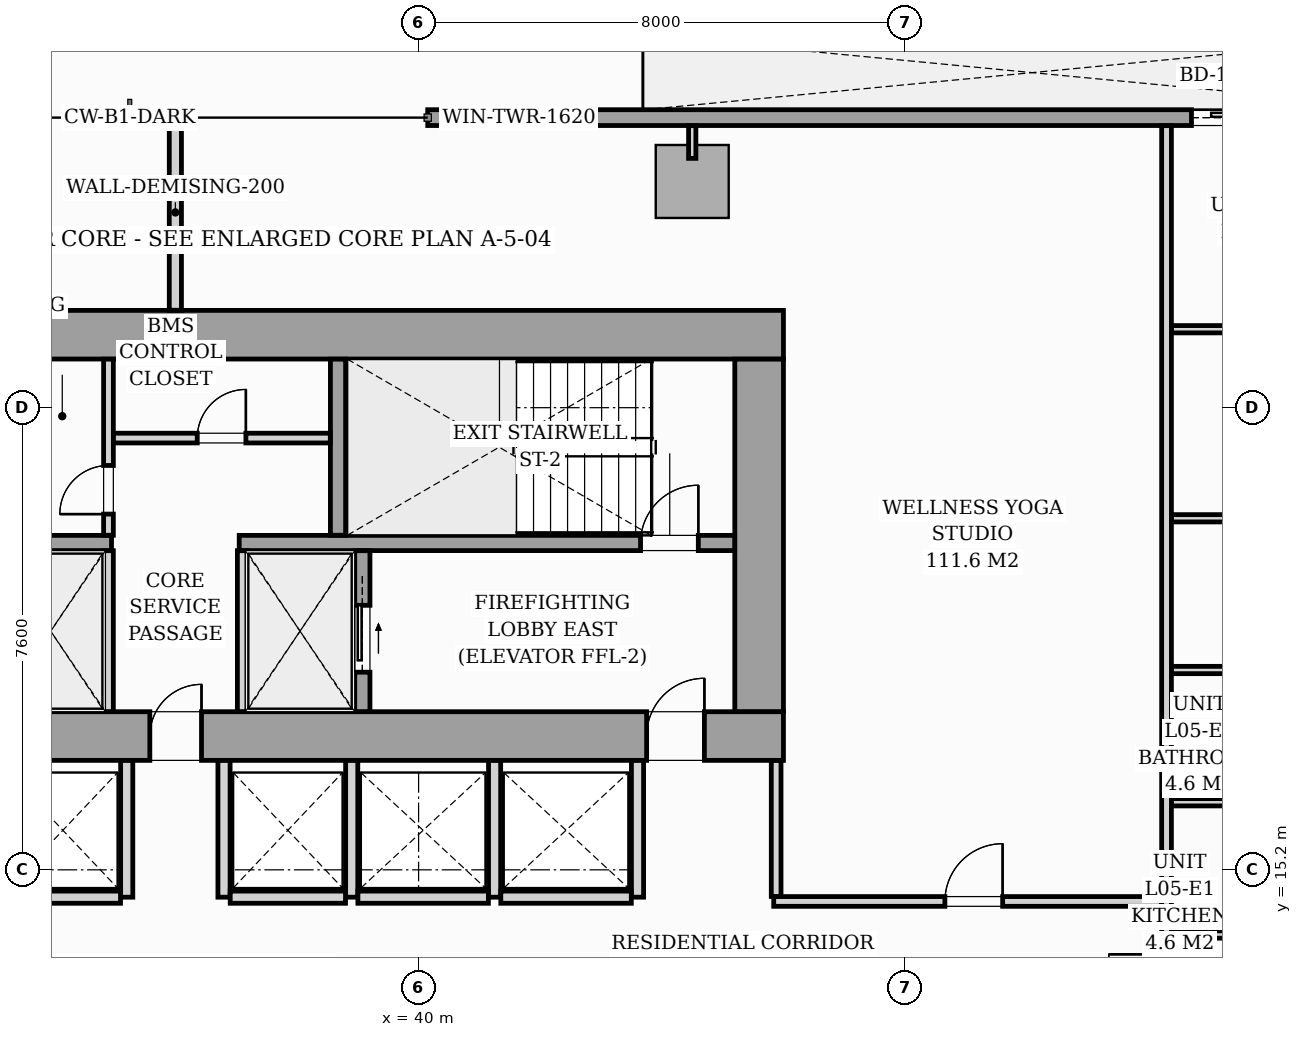
"""IFC4 building model, lengths in metres.
Left out: names, types, materials, properties, quantities, classifications, styles, units other than length and angle.
Written with IfcOpenShell. Run it as: python <this file> out.ifc"""

import sys

from ifc_helpers import new_model, si_unit, direction, frame, frame_2d, origin, origin_2d, place, context, subcontext, project, spatial, rectangle, i_section, extrude, source, transform, mapped, element, fill, save


model = new_model("IFC4")
c1 = context("Model", 3, precision=1e-05, world=origin(), true_north=direction((0.0, 1.0)))
c2 = subcontext(c1, "Body", "Model", "MODEL_VIEW")
j1 = project(units=[si_unit("LENGTHUNIT", "METRE"), si_unit("PLANEANGLEUNIT", "RADIAN")], contexts=[c1])
p1 = place(None, origin())
s1 = spatial("IfcSite", under=j1, at=p1, CompositionType="ELEMENT")
p2 = place(p1, origin())
s2 = spatial("IfcBuilding", under=s1, at=p2, CompositionType="ELEMENT")
p3 = place(p2, frame((0.0, 0.0, 23.0)))
s3 = spatial("IfcBuildingStorey", under=s2, at=p3, CompositionType="ELEMENT", Elevation=23.0)
m1 = source(origin(), c2, "Body", "SweptSolid", [
    extrude(i_section(OverallWidth=0.437, OverallDepth=0.514, WebThickness=0.061, FlangeThickness=0.097, FilletRadius=0.018, at=origin_2d()), origin(), (0.0, 0.0, 1.0), 3.196),
])
for number, where, z_axis, x_axis in (
    (1, (38.88, 17.4, 0.002), (0.0, 0.0, 1.0), (1.0, 0.0, 0.0)),
    (2, (45.6, 17.4, 0.002), (0.0, 0.0, 1.0), (1.0, 0.0, 0.0)),
    (3, (38.88, 24.0, 0.002), (0.0, 0.0, 1.0), (1.0, 0.0, 0.0)),
    (4, (45.6, 24.0, 0.002), (0.0, 0.0, 1.0), (1.0, 0.0, 0.0)),
):
    element("IfcColumn", number, at=place(p3, frame(where, z_axis=z_axis, x_axis=x_axis)), inside=s3, PredefinedType="PILASTER", context=c2, shape_type="MappedRepresentation", body=[
        mapped(m1, transform((0.0, 0.0, 0.0), scale=1.0)),
    ])
m2 = source(origin(), c2, "Body", "SweptSolid", [
    extrude(rectangle(XDim=1.2, YDim=1.2, at=origin_2d()), origin(), (0.0, 0.0, 1.0), 3.194),
])
p4 = place(p3, frame((44.5, 26.52, 0.004), z_axis=(0.0, 0.0, 1.0), x_axis=(1.0, 0.0, 0.0)))
e5 = element("IfcColumn", 5, at=p4, inside=s3, PredefinedType="COLUMN", context=c2, shape_type="MappedRepresentation", body=[
    mapped(m2, transform((0.0, 0.0, 0.0), scale=1.0)),
])
p5 = place(p3, frame((40.15, 27.57, 0.0), z_axis=(0.0, 0.0, 1.0), x_axis=(1.0, 0.0, 0.0)))
e6 = element("IfcWall", 6, at=p5, inside=s3, PredefinedType="STANDARD", context=c2, shape_type="SweptSolid", body=[
    extrude(rectangle(XDim=17.15, YDim=0.26, at=frame_2d((8.575, 0.0))), origin(), (0.0, 0.0, 1.0), 2.94),
])
p6 = place(p5, frame((12.56, 0.0, 0.0)))
e7 = element("IfcOpeningElement", 7, at=p6, cuts=e6, PredefinedType="OPENING", context=c2, shape_type="SweptSolid", body=[
    extrude(rectangle(XDim=1.8, YDim=2.06, at=frame_2d((0.9, 1.03))), frame((0.0, 0.14, 0.0), z_axis=(0.0, -1.0, 0.0), x_axis=(1.0, 0.0, 0.0)), (0.0, 0.0, 1.0), 0.28),
])
p7 = place(p5, frame((0.7, 0.0, 0.65)))
e8 = element("IfcOpeningElement", 8, at=p7, cuts=e6, PredefinedType="OPENING", context=c2, shape_type="SweptSolid", body=[
    extrude(rectangle(XDim=1.6, YDim=1.5, at=frame_2d((0.8, 0.75))), frame((0.0, 0.14, 0.0), z_axis=(0.0, -1.0, 0.0), x_axis=(1.0, 0.0, 0.0)), (0.0, 0.0, 1.0), 0.28),
])
p8 = place(p3, frame((26.0, 17.4, 0.0), z_axis=(0.0, 0.0, 1.0), x_axis=(1.0, 0.0, 0.0)))
e9 = element("IfcWall", 9, at=p8, inside=s3, PredefinedType="SHEAR", context=c2, shape_type="SweptSolid", body=[
    extrude(rectangle(XDim=20.0, YDim=0.8, at=frame_2d((10.0, 0.0))), origin(), (0.0, 0.0, 1.0), 3.2),
])
p9 = place(p8, frame((1.15, 0.0, 0.0)))
e10 = element("IfcOpeningElement", 10, at=p9, cuts=e9, PredefinedType="OPENING", context=c2, shape_type="SweptSolid", body=[
    extrude(rectangle(XDim=0.95, YDim=2.06, at=frame_2d((0.475, 1.03))), frame((0.0, 0.41, 0.0), z_axis=(0.0, -1.0, 0.0), x_axis=(1.0, 0.0, 0.0)), (0.0, 0.0, 1.0), 0.82),
])
p10 = place(p8, frame((9.58, 0.0, 0.0)))
e11 = element("IfcOpeningElement", 11, at=p10, cuts=e9, PredefinedType="OPENING", context=c2, shape_type="SweptSolid", body=[
    extrude(rectangle(XDim=0.85, YDim=2.0, at=frame_2d((0.425, 1.0))), frame((0.0, 0.41, 0.0), z_axis=(0.0, -1.0, 0.0), x_axis=(1.0, 0.0, 0.0)), (0.0, 0.0, 1.0), 0.82),
])
p11 = place(p8, frame((17.75, 0.0, 0.0)))
e12 = element("IfcOpeningElement", 12, at=p11, cuts=e9, PredefinedType="OPENING", context=c2, shape_type="SweptSolid", body=[
    extrude(rectangle(XDim=0.95, YDim=2.06, at=frame_2d((0.475, 1.03))), frame((0.0, 0.41, 0.0), z_axis=(0.0, -1.0, 0.0), x_axis=(1.0, 0.0, 0.0)), (0.0, 0.0, 1.0), 0.82),
])
p12 = place(p3, frame((26.0, 24.0, 0.0), z_axis=(0.0, 0.0, 1.0), x_axis=(1.0, 0.0, 0.0)))
e13 = element("IfcWall", 13, at=p12, inside=s3, PredefinedType="SHEAR", context=c2, shape_type="SweptSolid", body=[
    extrude(rectangle(XDim=20.0, YDim=0.8, at=frame_2d((10.0, 0.0))), origin(), (0.0, 0.0, 1.0), 3.2),
])
p13 = place(p3, frame((45.6, 17.802, 0.0), z_axis=(0.0, 0.0, 1.0), x_axis=(0.0, 1.0, 0.0)))
e14 = element("IfcWall", 14, at=p13, inside=s3, PredefinedType="SHEAR", context=c2, shape_type="SweptSolid", body=[
    extrude(rectangle(XDim=5.796, YDim=0.8, at=frame_2d((2.898, 0.0))), origin(), (0.0, 0.0, 1.0), 3.2),
])
p14 = place(p3, frame((26.802, 20.575, 0.0), z_axis=(0.0, 0.0, 1.0), x_axis=(1.0, 0.0, 0.0)))
e15 = element("IfcWall", 15, at=p14, inside=s3, PredefinedType="SOLIDWALL", context=c2, shape_type="SweptSolid", body=[
    extrude(rectangle(XDim=8.148, YDim=0.25, at=frame_2d((4.074, 0.0))), origin(), (0.0, 0.0, 1.0), 3.2),
])
p15 = place(p14, frame((0.398, 0.0, 0.0)))
e16 = element("IfcOpeningElement", 16, at=p15, cuts=e15, PredefinedType="OPENING", context=c2, shape_type="SweptSolid", body=[
    extrude(rectangle(XDim=0.95, YDim=2.06, at=frame_2d((0.475, 1.03))), frame((0.0, 0.135, 0.0), z_axis=(0.0, -1.0, 0.0), x_axis=(1.0, 0.0, 0.0)), (0.0, 0.0, 1.0), 0.27),
])
p16 = place(p3, frame((37.05, 20.575, 0.0), z_axis=(0.0, 0.0, 1.0), x_axis=(1.0, 0.0, 0.0)))
e17 = element("IfcWall", 17, at=p16, inside=s3, PredefinedType="SOLIDWALL", context=c2, shape_type="SweptSolid", body=[
    extrude(rectangle(XDim=8.148, YDim=0.25, at=frame_2d((4.074, 0.0))), origin(), (0.0, 0.0, 1.0), 3.2),
])
p17 = place(p16, frame((6.6, 0.0, 0.0)))
e18 = element("IfcOpeningElement", 18, at=p17, cuts=e17, PredefinedType="OPENING", context=c2, shape_type="SweptSolid", body=[
    extrude(rectangle(XDim=0.95, YDim=2.06, at=frame_2d((0.475, 1.03))), frame((0.0, 0.135, 0.0), z_axis=(0.0, -1.0, 0.0), x_axis=(1.0, 0.0, 0.0)), (0.0, 0.0, 1.0), 0.27),
])
p18 = place(p3, frame((38.675, 20.702, 0.0), z_axis=(0.0, 0.0, 1.0), x_axis=(0.0, 1.0, 0.0)))
e19 = element("IfcWall", 19, at=p18, inside=s3, PredefinedType="SOLIDWALL", context=c2, shape_type="SweptSolid", body=[
    extrude(rectangle(XDim=2.896, YDim=0.25, at=frame_2d((1.448, 0.0))), origin(), (0.0, 0.0, 1.0), 3.2),
])
for number, where, z_axis, x_axis in (
    (20, (34.9, 17.802, 0.0), (0.0, 0.0, 1.0), (0.0, 1.0, 0.0)),
    (21, (37.1, 17.802, 0.0), (0.0, 0.0, 1.0), (0.0, 1.0, 0.0)),
):
    element("IfcWall", number, at=place(p3, frame(where, z_axis=z_axis, x_axis=x_axis)), inside=s3, PredefinedType="PARTITIONING", context=c2, shape_type="SweptSolid", body=[
        extrude(rectangle(XDim=2.646, YDim=0.16, at=frame_2d((1.323, 0.0))), origin(), (0.0, 0.0, 1.0), 2.94),
    ])
p19 = place(p3, frame((39.075, 17.802, 0.0), z_axis=(0.0, 0.0, 1.0), x_axis=(0.0, 1.0, 0.0)))
e22 = element("IfcWall", 22, at=p19, inside=s3, PredefinedType="SOLIDWALL", context=c2, shape_type="SweptSolid", body=[
    extrude(rectangle(XDim=2.646, YDim=0.25, at=frame_2d((1.323, 0.0))), origin(), (0.0, 0.0, 1.0), 3.2),
])
p20 = place(p19, frame((0.648, 0.0, 0.0)))
e23 = element("IfcOpeningElement", 23, at=p20, cuts=e22, PredefinedType="OPENING", context=c2, shape_type="SweptSolid", body=[
    extrude(rectangle(XDim=1.1, YDim=2.08, at=frame_2d((0.55, 1.04))), frame((0.0, 0.135, 0.0), z_axis=(0.0, -1.0, 0.0), x_axis=(1.0, 0.0, 0.0)), (0.0, 0.0, 1.0), 0.27),
])
p21 = place(p3, frame((34.9, 20.702, 0.0), z_axis=(0.0, 0.0, 1.0), x_axis=(0.0, 1.0, 0.0)))
e24 = element("IfcWall", 24, at=p21, inside=s3, PredefinedType="PARTITIONING", context=c2, shape_type="SweptSolid", body=[
    extrude(rectangle(XDim=2.896, YDim=0.16, at=frame_2d((1.448, 0.0))), origin(), (0.0, 0.0, 1.0), 2.94),
])
p22 = place(p21, frame((0.348, 0.0, 0.0)))
e25 = element("IfcOpeningElement", 25, at=p22, cuts=e24, PredefinedType="OPENING", context=c2, shape_type="SweptSolid", body=[
    extrude(rectangle(XDim=0.8, YDim=2.05, at=frame_2d((0.4, 1.025))), frame((0.0, 0.09, 0.0), z_axis=(0.0, -1.0, 0.0), x_axis=(1.0, 0.0, 0.0)), (0.0, 0.0, 1.0), 0.18),
])
p23 = place(p3, frame((34.982, 22.3, 0.0), z_axis=(0.0, 0.0, 1.0), x_axis=(1.0, 0.0, 0.0)))
e26 = element("IfcWall", 26, at=p23, inside=s3, PredefinedType="PARTITIONING", context=c2, shape_type="SweptSolid", body=[
    extrude(rectangle(XDim=3.566, YDim=0.16, at=frame_2d((1.783, 0.0))), origin(), (0.0, 0.0, 1.0), 2.94),
])
p24 = place(p23, frame((1.378, 0.0, 0.0)))
e27 = element("IfcOpeningElement", 27, at=p24, cuts=e26, PredefinedType="OPENING", context=c2, shape_type="SweptSolid", body=[
    extrude(rectangle(XDim=0.8, YDim=2.05, at=frame_2d((0.4, 1.025))), frame((0.0, 0.09, 0.0), z_axis=(0.0, -1.0, 0.0), x_axis=(1.0, 0.0, 0.0)), (0.0, 0.0, 1.0), 0.18),
])
p25 = place(p3, frame((35.2, 14.75, 0.0), z_axis=(0.0, 0.0, 1.0), x_axis=(0.0, 1.0, 0.0)))
e28 = element("IfcWall", 28, at=p25, inside=s3, PredefinedType="PARTITIONING", context=c2, shape_type="SweptSolid", body=[
    extrude(rectangle(XDim=2.248, YDim=0.2, at=frame_2d((1.124, 0.0))), origin(), (0.0, 0.0, 1.0), 2.94),
])
p26 = place(p3, frame((33.202, 14.75, 0.0), z_axis=(0.0, 0.0, 1.0), x_axis=(1.0, 0.0, 0.0)))
e29 = element("IfcWall", 29, at=p26, inside=s3, PredefinedType="PARTITIONING", context=c2, shape_type="SweptSolid", body=[
    extrude(rectangle(XDim=1.896, YDim=0.2, at=frame_2d((0.948, 0.0))), origin(), (0.0, 0.0, 1.0), 2.94),
])
for number, where, z_axis, x_axis in (
    (30, (36.8, 14.75, 0.0), (0.0, 0.0, 1.0), (0.0, 1.0, 0.0)),
    (31, (38.9, 14.75, 0.0), (0.0, 0.0, 1.0), (0.0, 1.0, 0.0)),
):
    element("IfcWall", number, at=place(p3, frame(where, z_axis=z_axis, x_axis=x_axis)), inside=s3, PredefinedType="PARTITIONING", context=c2, shape_type="SweptSolid", body=[
        extrude(rectangle(XDim=2.248, YDim=0.2, at=frame_2d((1.124, 0.0))), origin(), (0.0, 0.0, 1.0), 2.94),
    ])
p27 = place(p3, frame((36.902, 14.75, 0.0), z_axis=(0.0, 0.0, 1.0), x_axis=(1.0, 0.0, 0.0)))
e32 = element("IfcWall", 32, at=p27, inside=s3, PredefinedType="PARTITIONING", context=c2, shape_type="SweptSolid", body=[
    extrude(rectangle(XDim=1.896, YDim=0.2, at=frame_2d((0.948, 0.0))), origin(), (0.0, 0.0, 1.0), 2.94),
])
for number, where, z_axis, x_axis in (
    (33, (41.25, 14.75, 0.0), (0.0, 0.0, 1.0), (0.0, 1.0, 0.0)),
    (34, (43.6, 14.75, 0.0), (0.0, 0.0, 1.0), (0.0, 1.0, 0.0)),
):
    element("IfcWall", number, at=place(p3, frame(where, z_axis=z_axis, x_axis=x_axis)), inside=s3, PredefinedType="PARTITIONING", context=c2, shape_type="SweptSolid", body=[
        extrude(rectangle(XDim=2.248, YDim=0.2, at=frame_2d((1.124, 0.0))), origin(), (0.0, 0.0, 1.0), 2.94),
    ])
for number, where, z_axis, x_axis in (
    (35, (39.002, 14.75, 0.0), (0.0, 0.0, 1.0), (1.0, 0.0, 0.0)),
    (36, (41.352, 14.75, 0.0), (0.0, 0.0, 1.0), (1.0, 0.0, 0.0)),
):
    element("IfcWall", number, at=place(p3, frame(where, z_axis=z_axis, x_axis=x_axis)), inside=s3, PredefinedType="PARTITIONING", context=c2, shape_type="SweptSolid", body=[
        extrude(rectangle(XDim=2.146, YDim=0.2, at=frame_2d((1.073, 0.0))), origin(), (0.0, 0.0, 1.0), 2.94),
    ])
p28 = place(p3, frame((52.3, 12.432, 0.0), z_axis=(0.0, 0.0, 1.0), x_axis=(0.0, 1.0, 0.0)))
e37 = element("IfcWall", 37, at=p28, inside=s3, PredefinedType="PARTITIONING", context=c2, shape_type="SweptSolid", body=[
    extrude(rectangle(XDim=15.006, YDim=0.16, at=frame_2d((7.503, 0.0))), origin(), (0.0, 0.0, 1.0), 2.94),
])
p29 = place(p28, frame((0.429, 0.0, 0.0)))
e38 = element("IfcOpeningElement", 38, at=p29, cuts=e37, PredefinedType="OPENING", context=c2, shape_type="SweptSolid", body=[
    extrude(rectangle(XDim=0.95, YDim=2.06, at=frame_2d((0.475, 1.03))), frame((0.0, 0.09, 0.0), z_axis=(0.0, -1.0, 0.0), x_axis=(1.0, 0.0, 0.0)), (0.0, 0.0, 1.0), 0.18),
])
p30 = place(p3, frame((36.0, 24.402, 0.0), z_axis=(0.0, 0.0, 1.0), x_axis=(0.0, 1.0, 0.0)))
e39 = element("IfcWall", 39, at=p30, inside=s3, PredefinedType="PARTITIONING", context=c2, shape_type="SweptSolid", body=[
    extrude(rectangle(XDim=3.218, YDim=0.2, at=frame_2d((1.609, 0.0))), origin(), (0.0, 0.0, 1.0), 2.94),
])
p31 = place(p3, frame((52.382, 16.311, 0.0), z_axis=(0.0, 0.0, 1.0), x_axis=(1.0, 0.0, 0.0)))
e40 = element("IfcWall", 40, at=p31, inside=s3, PredefinedType="PARTITIONING", context=c2, shape_type="SweptSolid", body=[
    extrude(rectangle(XDim=2.256, YDim=0.12, at=frame_2d((1.128, 0.0))), origin(), (0.0, 0.0, 1.0), 2.045),
])
for number, where, z_axis, x_axis in (
    (41, (52.382, 14.136, 0.0), (0.0, 0.0, 1.0), (1.0, 0.0, 0.0)),
    (42, (52.382, 18.486, 0.0), (0.0, 0.0, 1.0), (1.0, 0.0, 0.0)),
):
    element("IfcWall", number, at=place(p3, frame(where, z_axis=z_axis, x_axis=x_axis)), inside=s3, PredefinedType="PARTITIONING", context=c2, shape_type="SweptSolid", body=[
        extrude(rectangle(XDim=2.256, YDim=0.12, at=frame_2d((1.128, 0.0))), origin(), (0.0, 0.0, 1.0), 2.94),
    ])
p32 = place(p3, frame((52.382, 24.09, 0.0), z_axis=(0.0, 0.0, 1.0), x_axis=(1.0, 0.0, 0.0)))
e43 = element("IfcWall", 43, at=p32, inside=s3, PredefinedType="PARTITIONING", context=c2, shape_type="SweptSolid", body=[
    extrude(rectangle(XDim=7.338, YDim=0.12, at=frame_2d((3.669, 0.0))), origin(), (0.0, 0.0, 1.0), 2.94),
])
p33 = place(p32, frame((3.253, 0.0, 0.0)))
e44 = element("IfcOpeningElement", 44, at=p33, cuts=e43, PredefinedType="OPENING", context=c2, shape_type="SweptSolid", body=[
    extrude(rectangle(XDim=0.85, YDim=2.05, at=frame_2d((0.425, 1.025))), frame((0.0, 0.07, 0.0), z_axis=(0.0, -1.0, 0.0), x_axis=(1.0, 0.0, 0.0)), (0.0, 0.0, 1.0), 0.14),
])
p34 = place(p3, frame((52.382, 20.981, 0.0), z_axis=(0.0, 0.0, 1.0), x_axis=(1.0, 0.0, 0.0)))
e45 = element("IfcWall", 45, at=p34, inside=s3, PredefinedType="PARTITIONING", context=c2, shape_type="SweptSolid", body=[
    extrude(rectangle(XDim=7.338, YDim=0.12, at=frame_2d((3.669, 0.0))), origin(), (0.0, 0.0, 1.0), 2.94),
])
p35 = place(p34, frame((3.253, 0.0, 0.0)))
e46 = element("IfcOpeningElement", 46, at=p35, cuts=e45, PredefinedType="OPENING", context=c2, shape_type="SweptSolid", body=[
    extrude(rectangle(XDim=0.85, YDim=2.05, at=frame_2d((0.425, 1.025))), frame((0.0, 0.07, 0.0), z_axis=(0.0, -1.0, 0.0), x_axis=(1.0, 0.0, 0.0)), (0.0, 0.0, 1.0), 0.14),
])
p36 = place(p3, frame((45.84, 14.68, 0.0), z_axis=(0.0, 0.0, 1.0), x_axis=(1.0, 0.0, 0.0)))
e47 = element("IfcWall", 47, at=p36, inside=s3, PredefinedType="PARTITIONING", context=c2, shape_type="SweptSolid", body=[
    extrude(rectangle(XDim=6.378, YDim=0.16, at=frame_2d((3.189, 0.0))), origin(), (0.0, 0.0, 1.0), 2.94),
])
p37 = place(p36, frame((2.815, 0.0, 0.0)))
e48 = element("IfcOpeningElement", 48, at=p37, cuts=e47, PredefinedType="OPENING", context=c2, shape_type="SweptSolid", body=[
    extrude(rectangle(XDim=0.95, YDim=2.06, at=frame_2d((0.475, 1.03))), frame((0.0, 0.09, 0.0), z_axis=(0.0, -1.0, 0.0), x_axis=(1.0, 0.0, 0.0)), (0.0, 0.0, 1.0), 0.18),
])
p38 = place(p3, frame((45.88, 14.762, 0.0), z_axis=(0.0, 0.0, 1.0), x_axis=(0.0, 1.0, 0.0)))
e49 = element("IfcWall", 49, at=p38, inside=s3, PredefinedType="PARTITIONING", context=c2, shape_type="SweptSolid", body=[
    extrude(rectangle(XDim=2.236, YDim=0.16, at=frame_2d((1.118, 0.0))), origin(), (0.0, 0.0, 1.0), 2.94),
])
p39 = place(p3, frame((44.5, 26.9, 0.0), z_axis=(0.0, 0.0, 1.0), x_axis=(0.0, 1.0, 0.0)))
e50 = element("IfcWall", 50, at=p39, inside=s3, PredefinedType="PARTITIONING", context=c2, shape_type="SweptSolid", body=[
    extrude(rectangle(XDim=0.538, YDim=0.12, at=frame_2d((0.269, 0.0))), origin(), (0.0, 0.0, 1.0), 2.94),
])
m3 = source(origin(), c2, "Body", "SweptSolid", [
    extrude(rectangle(XDim=1.8, YDim=2.06, at=frame_2d((0.9, 1.03))), frame((0.0, 0.025, 0.0), z_axis=(0.0, -1.0, 0.0), x_axis=(1.0, 0.0, 0.0)), (0.0, 0.0, 1.0), 0.05),
])
p40 = place(p6, origin())
e51 = element("IfcDoor", 51, at=p40, inside=s3, OperationType="SLIDING_TO_RIGHT", PredefinedType="DOOR", context=c2, shape_type="MappedRepresentation", body=[
    mapped(m3, transform((0.0, 0.0, 0.0), scale=1.0)),
])
fill(e7, e51)
m4 = source(origin(), c2, "Body", "SweptSolid", [
    extrude(rectangle(XDim=1.6, YDim=1.5, at=frame_2d((0.8, 0.75))), frame((0.0, 0.03, 0.0), z_axis=(0.0, -1.0, 0.0), x_axis=(1.0, 0.0, 0.0)), (0.0, 0.0, 1.0), 0.06),
])
p41 = place(p7, origin())
e52 = element("IfcWindow", 52, at=p41, inside=s3, PartitioningType="SINGLE_PANEL", PredefinedType="WINDOW", context=c2, shape_type="MappedRepresentation", body=[
    mapped(m4, transform((0.0, 0.0, 0.0), scale=1.0)),
])
fill(e8, e52)
m5 = source(origin(), c2, "Body", "SweptSolid", [
    extrude(rectangle(XDim=0.85, YDim=2.0, at=frame_2d((0.425, 1.0))), frame((0.0, 0.025, 0.0), z_axis=(0.0, -1.0, 0.0), x_axis=(1.0, 0.0, 0.0)), (0.0, 0.0, 1.0), 0.05),
])
p42 = place(p10, origin())
e53 = element("IfcDoor", 53, at=p42, inside=s3, OperationType="SINGLE_SWING_RIGHT", PredefinedType="DOOR", context=c2, shape_type="MappedRepresentation", body=[
    mapped(m5, transform((0.0, 0.0, 0.0), scale=1.0)),
])
fill(e11, e53)
m6 = source(origin(), c2, "Body", "SweptSolid", [
    extrude(rectangle(XDim=0.95, YDim=2.06, at=frame_2d((0.475, 1.03))), frame((0.0, 0.025, 0.0), z_axis=(0.0, -1.0, 0.0), x_axis=(1.0, 0.0, 0.0)), (0.0, 0.0, 1.0), 0.05),
])
p43 = place(p11, origin())
e54 = element("IfcDoor", 54, at=p43, inside=s3, OperationType="SINGLE_SWING_RIGHT", PredefinedType="DOOR", context=c2, shape_type="MappedRepresentation", body=[
    mapped(m6, transform((0.0, 0.0, 0.0), scale=1.0)),
])
fill(e12, e54)
p44 = place(p17, origin())
e55 = element("IfcDoor", 55, at=p44, inside=s3, OperationType="SINGLE_SWING_RIGHT", PredefinedType="DOOR", context=c2, shape_type="MappedRepresentation", body=[
    mapped(m6, transform((0.0, 0.0, 0.0), scale=1.0)),
])
fill(e18, e55)
m7 = source(origin(), c2, "Body", "SweptSolid", [
    extrude(rectangle(XDim=1.1, YDim=2.08, at=frame_2d((0.55, 1.04))), frame((0.0, 0.025, 0.0), z_axis=(0.0, -1.0, 0.0), x_axis=(1.0, 0.0, 0.0)), (0.0, 0.0, 1.0), 0.05),
])
p45 = place(p20, origin())
e56 = element("IfcDoor", 56, at=p45, inside=s3, OperationType="SLIDING_TO_RIGHT", PredefinedType="DOOR", context=c2, shape_type="MappedRepresentation", body=[
    mapped(m7, transform((0.0, 0.0, 0.0), scale=1.0)),
])
fill(e23, e56)
m8 = source(origin(), c2, "Body", "SweptSolid", [
    extrude(rectangle(XDim=0.8, YDim=2.05, at=frame_2d((0.4, 1.025))), frame((0.0, 0.025, 0.0), z_axis=(0.0, -1.0, 0.0), x_axis=(1.0, 0.0, 0.0)), (0.0, 0.0, 1.0), 0.05),
])
p46 = place(p22, origin())
e57 = element("IfcDoor", 57, at=p46, inside=s3, OperationType="SINGLE_SWING_LEFT", PredefinedType="DOOR", context=c2, shape_type="MappedRepresentation", body=[
    mapped(m8, transform((0.0, 0.0, 0.0), scale=1.0)),
])
fill(e25, e57)
p47 = place(p24, origin())
e58 = element("IfcDoor", 58, at=p47, inside=s3, OperationType="SINGLE_SWING_RIGHT", PredefinedType="DOOR", context=c2, shape_type="MappedRepresentation", body=[
    mapped(m8, transform((0.0, 0.0, 0.0), scale=1.0)),
])
fill(e27, e58)
m9 = source(origin(), c2, "Body", "SweptSolid", [
    extrude(rectangle(XDim=0.95, YDim=2.06, at=frame_2d((0.475, 1.03))), frame((0.0, 0.025, 0.0), z_axis=(0.0, -1.0, 0.0), x_axis=(1.0, 0.0, 0.0)), (0.0, 0.0, 1.0), 0.05),
])
p48 = place(p29, origin())
e59 = element("IfcDoor", 59, at=p48, inside=s3, OperationType="SINGLE_SWING_RIGHT", PredefinedType="DOOR", context=c2, shape_type="MappedRepresentation", body=[
    mapped(m9, transform((0.0, 0.0, 0.0), scale=1.0)),
])
fill(e38, e59)
p49 = place(p37, origin())
e60 = element("IfcDoor", 60, at=p49, inside=s3, OperationType="SINGLE_SWING_RIGHT", PredefinedType="DOOR", context=c2, shape_type="MappedRepresentation", body=[
    mapped(m9, transform((0.0, 0.0, 0.0), scale=1.0)),
])
fill(e48, e60)
save(model, sys.argv[1])
